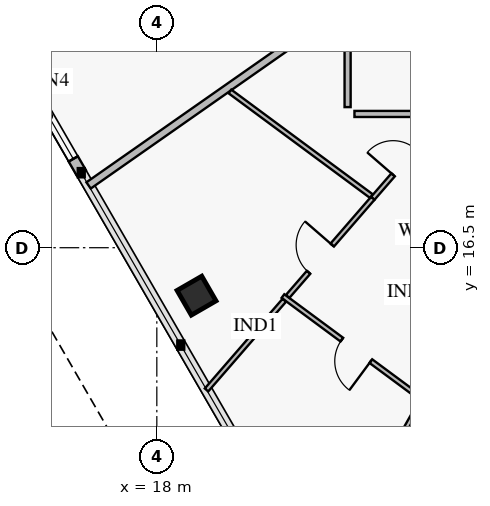
"""IFC4 building model, lengths in metres.
Left out: names, types, materials, properties, quantities, classifications, styles, units other than length and angle.
Written with IfcOpenShell. Run it as: python <this file> out.ifc"""

import sys

from ifc_helpers import new_model, si_unit, direction, frame, frame_2d, origin, origin_2d, place, context, subcontext, project, spatial, rectangle, extrude, element, fill, save


model = new_model("IFC4")
c1 = context("Model", 3, precision=1e-05, world=origin(), true_north=direction((0.0, 1.0)))
c2 = subcontext(c1, "Body", "Model", "MODEL_VIEW")
j1 = project(units=[si_unit("LENGTHUNIT", "METRE"), si_unit("PLANEANGLEUNIT", "RADIAN")], contexts=[c1])
p1 = place(None, origin())
s1 = spatial("IfcSite", under=j1, at=p1, CompositionType="ELEMENT")
p2 = place(p1, origin())
s2 = spatial("IfcBuilding", under=s1, at=p2, CompositionType="ELEMENT")
p3 = place(p2, frame((0.0, 0.0, 357.6)))
s3 = spatial("IfcBuildingStorey", under=s2, at=p3, CompositionType="ELEMENT", Elevation=357.6)
p4 = place(p3, frame((19.045, 15.238, 0.0), z_axis=(0.0, 0.0, 1.0), x_axis=(0.5, -0.866025403784, 0.0)))
e1 = element("IfcColumn", 1, at=p4, inside=s3, PredefinedType="COLUMN", context=c2, shape_type="SweptSolid", body=[
    extrude(rectangle(XDim=0.75, YDim=0.75, at=origin_2d()), origin(), (0.0, 0.0, 1.0), 3.35),
])
p5 = place(p3, frame((16.011, 18.473, 0.0), z_axis=(0.0, 0.0, 1.0), x_axis=(-0.500009156386, 0.866020117278, 0.0)))
e2 = element("IfcWall", 2, at=p5, inside=s3, PredefinedType="SOLIDWALL", context=c2, shape_type="SweptSolid", body=[
    extrude(rectangle(XDim=3.44, YDim=0.28, at=frame_2d((1.72, 0.0))), origin(), (0.0, 0.0, 1.0), 3.35),
])
p6 = place(p5, frame((0.42, 0.0, 0.7)))
e3 = element("IfcOpeningElement", 3, at=p6, cuts=e2, PredefinedType="OPENING", context=c2, shape_type="SweptSolid", body=[
    extrude(rectangle(XDim=2.6, YDim=1.8, at=frame_2d((1.3, 0.9))), frame((0.0, 0.152, 0.0), z_axis=(0.0, -1.0, 0.0), x_axis=(1.0, 0.0, 0.0)), (0.0, 0.0, 1.0), 0.304),
])
p7 = place(p3, frame((21.318, 15.227, 0.0), z_axis=(0.0, 0.0, 1.0), x_axis=(0.803862842845, -0.594814702149, 0.0)))
e4 = element("IfcWall", 4, at=p7, inside=s3, PredefinedType="PARTITIONING", context=c2, shape_type="SweptSolid", body=[
    extrude(rectangle(XDim=9.364, YDim=0.12, at=frame_2d((4.682, 0.0))), origin(), (0.0, 0.0, 1.0), 2.77),
])
p8 = place(p7, frame((1.928, 0.0, 0.0)))
e5 = element("IfcOpeningElement", 5, at=p8, cuts=e4, PredefinedType="OPENING", context=c2, shape_type="SweptSolid", body=[
    extrude(rectangle(XDim=0.95, YDim=2.1, at=frame_2d((0.475, 1.05))), frame((0.0, 0.072, 0.0), z_axis=(0.0, -1.0, 0.0), x_axis=(1.0, 0.0, 0.0)), (0.0, 0.0, 1.0), 0.144),
])
p9 = place(p7, frame((6.369, 0.0, 0.0)))
e6 = element("IfcOpeningElement", 6, at=p9, cuts=e4, PredefinedType="OPENING", context=c2, shape_type="SweptSolid", body=[
    extrude(rectangle(XDim=0.95, YDim=2.1, at=frame_2d((0.475, 1.05))), frame((0.0, 0.072, 0.0), z_axis=(0.0, -1.0, 0.0), x_axis=(1.0, 0.0, 0.0)), (0.0, 0.0, 1.0), 0.144),
])
p10 = place(p3, frame((25.114, 19.45, 0.0), z_axis=(0.0, 0.0, 1.0), x_axis=(-0.65532612628, -0.755346058582, 0.0)))
e7 = element("IfcWall", 7, at=p10, inside=s3, PredefinedType="PARTITIONING", context=c2, shape_type="SweptSolid", body=[
    extrude(rectangle(XDim=2.185, YDim=0.12, at=frame_2d((1.092, 0.0))), origin(), (0.0, 0.0, 1.0), 3.35),
])
p11 = place(p10, frame((0.468, 0.0, 0.0)))
e8 = element("IfcOpeningElement", 8, at=p11, cuts=e7, PredefinedType="OPENING", context=c2, shape_type="SweptSolid", body=[
    extrude(rectangle(XDim=0.9, YDim=2.1, at=frame_2d((0.45, 1.05))), frame((0.0, 0.072, 0.0), z_axis=(0.0, -1.0, 0.0), x_axis=(1.0, 0.0, 0.0)), (0.0, 0.0, 1.0), 0.144),
])
p12 = place(p3, frame((23.682, 17.8, 0.0), z_axis=(0.0, 0.0, 1.0), x_axis=(-0.655229787073, -0.755429630166, 0.0)))
e9 = element("IfcWall", 9, at=p12, inside=s3, PredefinedType="PARTITIONING", context=c2, shape_type="SweptSolid", body=[
    extrude(rectangle(XDim=3.416, YDim=0.12, at=frame_2d((1.708, 0.0))), origin(), (0.0, 0.0, 1.0), 3.35),
])
p13 = place(p12, frame((1.627, 0.0, 0.0)))
e10 = element("IfcOpeningElement", 10, at=p13, cuts=e9, PredefinedType="OPENING", context=c2, shape_type="SweptSolid", body=[
    extrude(rectangle(XDim=0.95, YDim=2.1, at=frame_2d((0.475, 1.05))), frame((0.0, 0.072, 0.0), z_axis=(0.0, -1.0, 0.0), x_axis=(1.0, 0.0, 0.0)), (0.0, 0.0, 1.0), 0.144),
])
p14 = place(p3, frame((21.354, 15.116, 0.0), z_axis=(0.0, 0.0, 1.0), x_axis=(-0.655266746687, -0.755397571273, 0.0)))
e11 = element("IfcWall", 11, at=p14, inside=s3, PredefinedType="PARTITIONING", context=c2, shape_type="SweptSolid", body=[
    extrude(rectangle(XDim=3.123, YDim=0.12, at=frame_2d((1.562, 0.0))), origin(), (0.0, 0.0, 1.0), 2.77),
])
p15 = place(p3, frame((23.06, 22.939, 0.0), z_axis=(0.0, 0.0, 1.0), x_axis=(-0.819159279368, -0.573566103448, 0.0)))
e12 = element("IfcWall", 12, at=p15, inside=s3, PredefinedType="PARTITIONING", context=c2, shape_type="SweptSolid", body=[
    extrude(rectangle(XDim=8.369, YDim=0.2, at=frame_2d((4.185, 0.0))), origin(), (0.0, 0.0, 1.0), 2.77),
])
p16 = place(p3, frame((24.954, 12.452, 0.0), z_axis=(0.0, 0.0, 1.0), x_axis=(-0.491983334858, -0.870604616472, 0.0)))
e13 = element("IfcWall", 13, at=p16, inside=s3, PredefinedType="PARTITIONING", context=c2, shape_type="SweptSolid", body=[
    extrude(rectangle(XDim=4.897, YDim=0.12, at=frame_2d((2.449, 0.0))), origin(), (0.0, 0.0, 1.0), 2.77),
])
p17 = place(p3, frame((19.924, 20.612, 0.0), z_axis=(0.0, 0.0, 1.0), x_axis=(0.803864605419, -0.594812320111, 0.0)))
e14 = element("IfcWall", 14, at=p17, inside=s3, PredefinedType="PARTITIONING", context=c2, shape_type="SweptSolid", body=[
    extrude(rectangle(XDim=4.627, YDim=0.12, at=frame_2d((2.313, 0.0))), origin(), (0.0, 0.0, 1.0), 2.8),
])
p18 = place(p3, frame((23.02, 22.779, 0.0), z_axis=(0.0, 0.0, 1.0), x_axis=(0.0, -1.0, 0.0)))
e15 = element("IfcWall", 15, at=p18, inside=s3, PredefinedType="PARTITIONING", context=c2, shape_type="SweptSolid", body=[
    extrude(rectangle(XDim=2.579, YDim=0.16, at=frame_2d((1.29, 0.0))), origin(), (0.0, 0.0, 1.0), 3.35),
])
p19 = place(p3, frame((23.2, 20.02, 0.0), z_axis=(0.0, 0.0, 1.0), x_axis=(1.0, 0.0, 0.0)))
e16 = element("IfcWall", 16, at=p19, inside=s3, PredefinedType="PARTITIONING", context=c2, shape_type="SweptSolid", body=[
    extrude(rectangle(XDim=2.318, YDim=0.16, at=frame_2d((1.159, 0.0))), origin(), (0.0, 0.0, 1.0), 2.8),
])
p20 = place(p6, origin())
e17 = element("IfcWindow", 17, at=p20, inside=s3, PartitioningType="SINGLE_PANEL", PredefinedType="WINDOW", context=c2, shape_type="SweptSolid", body=[
    extrude(rectangle(XDim=2.6, YDim=1.8, at=frame_2d((1.3, 0.9))), frame((0.0, 0.03, 0.0), z_axis=(0.0, -1.0, 0.0), x_axis=(1.0, 0.0, 0.0)), (0.0, 0.0, 1.0), 0.06),
])
fill(e3, e17)
p21 = place(p8, frame((0.95, 0.0, 0.0), z_axis=(0.0, 0.0, 1.0), x_axis=(-1.0, 0.0, 0.0)))
e18 = element("IfcDoor", 18, at=p21, inside=s3, OperationType="SINGLE_SWING_LEFT", PredefinedType="DOOR", context=c2, shape_type="SweptSolid", body=[
    extrude(rectangle(XDim=0.95, YDim=2.1, at=frame_2d((0.475, 1.05))), frame((0.0, 0.025, 0.0), z_axis=(0.0, -1.0, 0.0), x_axis=(1.0, 0.0, 0.0)), (0.0, 0.0, 1.0), 0.05),
])
fill(e5, e18)
p22 = place(p11, frame((0.9, 0.0, 0.0), z_axis=(0.0, 0.0, 1.0), x_axis=(-1.0, 0.0, 0.0)))
e19 = element("IfcDoor", 19, at=p22, inside=s3, OperationType="SINGLE_SWING_LEFT", PredefinedType="DOOR", context=c2, shape_type="SweptSolid", body=[
    extrude(rectangle(XDim=0.9, YDim=2.1, at=frame_2d((0.45, 1.05))), frame((0.0, 0.025, 0.0), z_axis=(0.0, -1.0, 0.0), x_axis=(1.0, 0.0, 0.0)), (0.0, 0.0, 1.0), 0.05),
])
fill(e8, e19)
p23 = place(p13, frame((0.95, 0.0, 0.0), z_axis=(0.0, 0.0, 1.0), x_axis=(-1.0, 0.0, 0.0)))
e20 = element("IfcDoor", 20, at=p23, inside=s3, OperationType="SINGLE_SWING_RIGHT", PredefinedType="DOOR", context=c2, shape_type="SweptSolid", body=[
    extrude(rectangle(XDim=0.95, YDim=2.1, at=frame_2d((0.475, 1.05))), frame((0.0, 0.025, 0.0), z_axis=(0.0, -1.0, 0.0), x_axis=(1.0, 0.0, 0.0)), (0.0, 0.0, 1.0), 0.05),
])
fill(e10, e20)
save(model, sys.argv[1])
